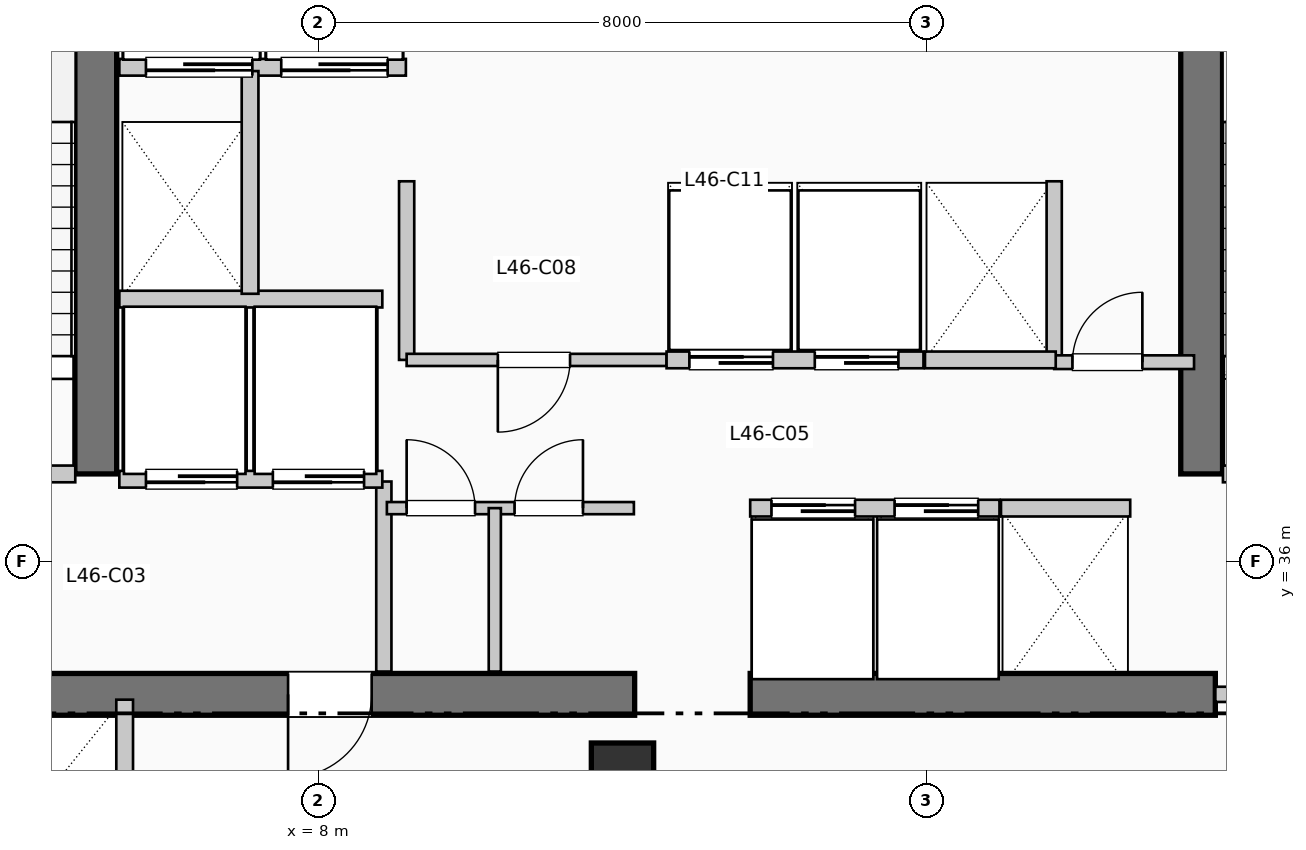
"""IFC4 building model, lengths in metres.
Left out: names, types, materials, properties, quantities, classifications, styles, units other than length and angle.
Written with IfcOpenShell. Run it as: python <this file> out.ifc"""

import sys

from ifc_helpers import new_model, si_unit, direction, frame, frame_2d, origin, origin_2d, place, context, subcontext, project, spatial, rectangle, extrude, element, fill, save


model = new_model("IFC4")
c1 = context("Model", 3, precision=1e-05, world=origin(), true_north=direction((0.0, 1.0)))
c2 = subcontext(c1, "Body", "Model", "MODEL_VIEW")
j1 = project(units=[si_unit("LENGTHUNIT", "METRE"), si_unit("PLANEANGLEUNIT", "RADIAN")], contexts=[c1])
p1 = place(None, origin())
s1 = spatial("IfcSite", under=j1, at=p1, CompositionType="ELEMENT")
p2 = place(p1, origin())
s2 = spatial("IfcBuilding", under=s1, at=p2, CompositionType="ELEMENT")
p3 = place(p2, frame((0.0, 0.0, 191.4)))
s3 = spatial("IfcBuildingStorey", under=s2, at=p3, CompositionType="ELEMENT", Elevation=191.4)
p4 = place(p3, frame((1.45, 34.25, 0.0), z_axis=(0.0, 0.0, 1.0), x_axis=(1.0, 0.0, 0.0)))
e1 = element("IfcWall", 1, at=p4, inside=s3, PredefinedType="SHEAR", context=c2, shape_type="SweptSolid", body=[
    extrude(rectangle(XDim=10.71, YDim=0.55, at=frame_2d((5.355, 0.0))), origin(), (0.0, 0.0, 1.0), 3.96),
])
p5 = place(p4, frame((7.25, 0.0, 0.0), z_axis=(0.0, 0.0, 1.0), x_axis=(-1.0, 0.0, 0.0)))
e2 = element("IfcOpeningElement", 2, at=p5, cuts=e1, PredefinedType="OPENING", context=c2, shape_type="SweptSolid", body=[
    extrude(rectangle(XDim=1.1, YDim=2.15, at=frame_2d((0.55, 1.075))), frame((0.0, 0.285, 0.0), z_axis=(0.0, -1.0, 0.0), x_axis=(1.0, 0.0, 0.0)), (0.0, 0.0, 1.0), 0.57),
])
p6 = place(p3, frame((13.68, 34.25, 0.0), z_axis=(0.0, 0.0, 1.0), x_axis=(1.0, 0.0, 0.0)))
e3 = element("IfcWall", 3, at=p6, inside=s3, PredefinedType="SHEAR", context=c2, shape_type="SweptSolid", body=[
    extrude(rectangle(XDim=6.12, YDim=0.55, at=frame_2d((3.06, 0.0))), origin(), (0.0, 0.0, 1.0), 3.96),
])
for number, where, z_axis, x_axis in (
    (4, (5.07, 37.15, 0.0), (0.0, 0.0, 1.0), (0.0, 1.0, 0.0)),
    (5, (19.62, 37.15, 0.0), (0.0, 0.0, 1.0), (0.0, 1.0, 0.0)),
):
    element("IfcWall", number, at=place(p3, frame(where, z_axis=z_axis, x_axis=x_axis)), inside=s3, PredefinedType="SHEAR", context=c2, shape_type="SweptSolid", body=[
        extrude(rectangle(XDim=7.89, YDim=0.55, at=frame_2d((3.945, 0.0))), origin(), (0.0, 0.0, 1.0), 3.96),
    ])
p7 = place(p3, frame((12.0, 33.2, 0.0), z_axis=(0.0, 0.0, 1.0), x_axis=(1.0, 0.0, 0.0)))
e6 = element("IfcColumn", 6, at=p7, inside=s3, PredefinedType="COLUMN", context=c2, shape_type="SweptSolid", body=[
    extrude(rectangle(XDim=0.82, YDim=0.82, at=origin_2d()), origin(), (0.0, 0.0, 1.0), 3.96),
])
p8 = place(p3, frame((1.65, 37.15, 0.0), z_axis=(0.0, 0.0, 1.0), x_axis=(1.0, 0.0, 0.0)))
e7 = element("IfcWall", 7, at=p8, inside=s3, PredefinedType="PARTITIONING", context=c2, shape_type="SweptSolid", body=[
    extrude(rectangle(XDim=3.15, YDim=0.22, at=frame_2d((1.575, 0.0))), origin(), (0.0, 0.0, 1.0), 3.71),
])
p9 = place(p8, frame((2.05, 0.0, 0.0), z_axis=(0.0, 0.0, 1.0), x_axis=(-1.0, 0.0, 0.0)))
e8 = element("IfcOpeningElement", 8, at=p9, cuts=e7, PredefinedType="OPENING", context=c2, shape_type="SweptSolid", body=[
    extrude(rectangle(XDim=1.05, YDim=2.15, at=frame_2d((0.525, 1.075))), frame((0.0, 0.12, 0.0), z_axis=(0.0, -1.0, 0.0), x_axis=(1.0, 0.0, 0.0)), (0.0, 0.0, 1.0), 0.24),
])
p10 = place(p3, frame((8.86, 34.55, 0.0), z_axis=(0.0, 0.0, 1.0), x_axis=(0.0, 1.0, 0.0)))
e9 = element("IfcWall", 9, at=p10, inside=s3, PredefinedType="PARTITIONING", context=c2, shape_type="SweptSolid", body=[
    extrude(rectangle(XDim=2.5, YDim=0.2, at=frame_2d((1.25, 0.0))), origin(), (0.0, 0.0, 1.0), 3.71),
])
p11 = place(p3, frame((19.9, 37.15, 0.0), z_axis=(0.0, 0.0, 1.0), x_axis=(1.0, 0.0, 0.0)))
e10 = element("IfcWall", 10, at=p11, inside=s3, PredefinedType="PARTITIONING", context=c2, shape_type="SweptSolid", body=[
    extrude(rectangle(XDim=3.15, YDim=0.22, at=frame_2d((1.575, 0.0))), origin(), (0.0, 0.0, 1.0), 3.71),
])
p12 = place(p11, frame((2.05, 0.0, 0.0), z_axis=(0.0, 0.0, 1.0), x_axis=(-1.0, 0.0, 0.0)))
e11 = element("IfcOpeningElement", 11, at=p12, cuts=e10, PredefinedType="OPENING", context=c2, shape_type="SweptSolid", body=[
    extrude(rectangle(XDim=1.05, YDim=2.15, at=frame_2d((0.525, 1.075))), frame((0.0, 0.12, 0.0), z_axis=(0.0, -1.0, 0.0), x_axis=(1.0, 0.0, 0.0)), (0.0, 0.0, 1.0), 0.24),
])
p13 = place(p3, frame((19.8, 34.25, 0.0), z_axis=(0.0, 0.0, 1.0), x_axis=(1.0, 0.0, 0.0)))
e12 = element("IfcWall", 12, at=p13, inside=s3, PredefinedType="PARTITIONING", context=c2, shape_type="SweptSolid", body=[
    extrude(rectangle(XDim=3.25, YDim=0.2, at=frame_2d((1.625, 0.0))), origin(), (0.0, 0.0, 1.0), 3.71),
])
p14 = place(p13, frame((2.15, 0.0, 0.0), z_axis=(0.0, 0.0, 1.0), x_axis=(-1.0, 0.0, 0.0)))
e13 = element("IfcOpeningElement", 13, at=p14, cuts=e12, PredefinedType="OPENING", context=c2, shape_type="SweptSolid", body=[
    extrude(rectangle(XDim=1.1, YDim=2.15, at=frame_2d((0.55, 1.075))), frame((0.0, 0.11, 0.0), z_axis=(0.0, -1.0, 0.0), x_axis=(1.0, 0.0, 0.0)), (0.0, 0.0, 1.0), 0.22),
])
p15 = place(p3, frame((5.38, 37.08, 0.0), z_axis=(0.0, 0.0, 1.0), x_axis=(1.0, 0.0, 0.0)))
e14 = element("IfcWall", 14, at=p15, inside=s3, PredefinedType="PARTITIONING", context=c2, shape_type="SweptSolid", body=[
    extrude(rectangle(XDim=3.46, YDim=0.22, at=frame_2d((1.73, 0.0))), origin(), (0.0, 0.0, 1.0), 3.71),
])
p16 = place(p15, frame((1.55, 0.0, 0.0), z_axis=(0.0, 0.0, 1.0), x_axis=(-1.0, 0.0, 0.0)))
e15 = element("IfcOpeningElement", 15, at=p16, cuts=e14, PredefinedType="OPENING", context=c2, shape_type="SweptSolid", body=[
    extrude(rectangle(XDim=1.2, YDim=2.2, at=frame_2d((0.6, 1.1))), frame((0.0, 0.12, 0.0), z_axis=(0.0, -1.0, 0.0), x_axis=(1.0, 0.0, 0.0)), (0.0, 0.0, 1.0), 0.24),
])
p17 = place(p15, frame((3.22, 0.0, 0.0), z_axis=(0.0, 0.0, 1.0), x_axis=(-1.0, 0.0, 0.0)))
e16 = element("IfcOpeningElement", 16, at=p17, cuts=e14, PredefinedType="OPENING", context=c2, shape_type="SweptSolid", body=[
    extrude(rectangle(XDim=1.2, YDim=2.2, at=frame_2d((0.6, 1.1))), frame((0.0, 0.12, 0.0), z_axis=(0.0, -1.0, 0.0), x_axis=(1.0, 0.0, 0.0)), (0.0, 0.0, 1.0), 0.24),
])
p18 = place(p3, frame((5.38, 39.45, 0.0), z_axis=(0.0, 0.0, 1.0), x_axis=(1.0, 0.0, 0.0)))
e17 = element("IfcWall", 17, at=p18, inside=s3, PredefinedType="PARTITIONING", context=c2, shape_type="SweptSolid", body=[
    extrude(rectangle(XDim=3.46, YDim=0.22, at=frame_2d((1.73, 0.0))), origin(), (0.0, 0.0, 1.0), 3.71),
])
p19 = place(p3, frame((5.38, 42.5, 0.0), z_axis=(0.0, 0.0, 1.0), x_axis=(1.0, 0.0, 0.0)))
e18 = element("IfcWall", 18, at=p19, inside=s3, PredefinedType="PARTITIONING", context=c2, shape_type="SweptSolid", body=[
    extrude(rectangle(XDim=3.77, YDim=0.22, at=frame_2d((1.885, 0.0))), origin(), (0.0, 0.0, 1.0), 3.71),
])
p20 = place(p19, frame((1.75, 0.0, 0.0), z_axis=(0.0, 0.0, 1.0), x_axis=(-1.0, 0.0, 0.0)))
e19 = element("IfcOpeningElement", 19, at=p20, cuts=e18, PredefinedType="OPENING", context=c2, shape_type="SweptSolid", body=[
    extrude(rectangle(XDim=1.4, YDim=2.2, at=frame_2d((0.7, 1.1))), frame((0.0, 0.12, 0.0), z_axis=(0.0, -1.0, 0.0), x_axis=(1.0, 0.0, 0.0)), (0.0, 0.0, 1.0), 0.24),
])
p21 = place(p19, frame((3.53, 0.0, 0.0), z_axis=(0.0, 0.0, 1.0), x_axis=(-1.0, 0.0, 0.0)))
e20 = element("IfcOpeningElement", 20, at=p21, cuts=e18, PredefinedType="OPENING", context=c2, shape_type="SweptSolid", body=[
    extrude(rectangle(XDim=1.4, YDim=2.2, at=frame_2d((0.7, 1.1))), frame((0.0, 0.12, 0.0), z_axis=(0.0, -1.0, 0.0), x_axis=(1.0, 0.0, 0.0)), (0.0, 0.0, 1.0), 0.24),
])
p22 = place(p3, frame((7.1, 39.52, 0.0), z_axis=(0.0, 0.0, 1.0), x_axis=(0.0, 1.0, 0.0)))
e21 = element("IfcWall", 21, at=p22, inside=s3, PredefinedType="PARTITIONING", context=c2, shape_type="SweptSolid", body=[
    extrude(rectangle(XDim=2.93, YDim=0.22, at=frame_2d((1.465, 0.0))), origin(), (0.0, 0.0, 1.0), 3.71),
])
p23 = place(p3, frame((5.45, 31.8, 0.0), z_axis=(0.0, 0.0, 1.0), x_axis=(0.0, 1.0, 0.0)))
e22 = element("IfcWall", 22, at=p23, inside=s3, PredefinedType="PARTITIONING", context=c2, shape_type="SweptSolid", body=[
    extrude(rectangle(XDim=2.38, YDim=0.22, at=frame_2d((1.19, 0.0))), origin(), (0.0, 0.0, 1.0), 3.71),
])
for number, where, z_axis, x_axis in (
    (23, (9.16, 38.65, 0.0), (0.0, 0.0, 1.0), (0.0, 1.0, 0.0)),
    (24, (17.68, 38.65, 0.0), (0.0, 0.0, 1.0), (0.0, 1.0, 0.0)),
):
    element("IfcWall", number, at=place(p3, frame(where, z_axis=z_axis, x_axis=x_axis)), inside=s3, PredefinedType="PARTITIONING", context=c2, shape_type="SweptSolid", body=[
        extrude(rectangle(XDim=2.35, YDim=0.2, at=frame_2d((1.175, 0.0))), origin(), (0.0, 0.0, 1.0), 3.71),
    ])
p24 = place(p3, frame((17.68, 38.62, 0.0), z_axis=(0.0, 0.0, 1.0), x_axis=(1.0, 0.0, 0.0)))
e25 = element("IfcWall", 25, at=p24, inside=s3, PredefinedType="PARTITIONING", context=c2, shape_type="SweptSolid", body=[
    extrude(rectangle(XDim=1.84, YDim=0.18, at=frame_2d((0.92, 0.0))), origin(), (0.0, 0.0, 1.0), 3.71),
])
p25 = place(p24, frame((0.24, 0.0, 0.0)))
e26 = element("IfcOpeningElement", 26, at=p25, cuts=e25, PredefinedType="OPENING", context=c2, shape_type="SweptSolid", body=[
    extrude(rectangle(XDim=0.92, YDim=2.1, at=frame_2d((0.46, 1.05))), frame((0.0, 0.1, 0.0), z_axis=(0.0, -1.0, 0.0), x_axis=(1.0, 0.0, 0.0)), (0.0, 0.0, 1.0), 0.2),
])
p26 = place(p3, frame((8.9, 36.7, 0.0), z_axis=(0.0, 0.0, 1.0), x_axis=(1.0, 0.0, 0.0)))
e27 = element("IfcWall", 27, at=p26, inside=s3, PredefinedType="PARTITIONING", context=c2, shape_type="SweptSolid", body=[
    extrude(rectangle(XDim=3.25, YDim=0.16, at=frame_2d((1.625, 0.0))), origin(), (0.0, 0.0, 1.0), 3.71),
])
p27 = place(p26, frame((0.26, 0.0, 0.0)))
e28 = element("IfcOpeningElement", 28, at=p27, cuts=e27, PredefinedType="OPENING", context=c2, shape_type="SweptSolid", body=[
    extrude(rectangle(XDim=0.9, YDim=2.15, at=frame_2d((0.45, 1.075))), frame((0.0, 0.09, 0.0), z_axis=(0.0, -1.0, 0.0), x_axis=(1.0, 0.0, 0.0)), (0.0, 0.0, 1.0), 0.18),
])
p28 = place(p26, frame((1.68, 0.0, 0.0)))
e29 = element("IfcOpeningElement", 29, at=p28, cuts=e27, PredefinedType="OPENING", context=c2, shape_type="SweptSolid", body=[
    extrude(rectangle(XDim=0.9, YDim=2.15, at=frame_2d((0.45, 1.075))), frame((0.0, 0.09, 0.0), z_axis=(0.0, -1.0, 0.0), x_axis=(1.0, 0.0, 0.0)), (0.0, 0.0, 1.0), 0.18),
])
p29 = place(p3, frame((10.32, 34.55, 0.0), z_axis=(0.0, 0.0, 1.0), x_axis=(0.0, 1.0, 0.0)))
e30 = element("IfcWall", 30, at=p29, inside=s3, PredefinedType="PARTITIONING", context=c2, shape_type="SweptSolid", body=[
    extrude(rectangle(XDim=2.15, YDim=0.16, at=frame_2d((1.075, 0.0))), origin(), (0.0, 0.0, 1.0), 3.71),
])
p30 = place(p3, frame((9.16, 38.65, 0.0), z_axis=(0.0, 0.0, 1.0), x_axis=(1.0, 0.0, 0.0)))
e31 = element("IfcWall", 31, at=p30, inside=s3, PredefinedType="PARTITIONING", context=c2, shape_type="SweptSolid", body=[
    extrude(rectangle(XDim=3.42, YDim=0.16, at=frame_2d((1.71, 0.0))), origin(), (0.0, 0.0, 1.0), 3.71),
])
p31 = place(p30, frame((2.15, 0.0, 0.0), z_axis=(0.0, 0.0, 1.0), x_axis=(-1.0, 0.0, 0.0)))
e32 = element("IfcOpeningElement", 32, at=p31, cuts=e31, PredefinedType="OPENING", context=c2, shape_type="SweptSolid", body=[
    extrude(rectangle(XDim=0.95, YDim=2.15, at=frame_2d((0.475, 1.075))), frame((0.0, 0.09, 0.0), z_axis=(0.0, -1.0, 0.0), x_axis=(1.0, 0.0, 0.0)), (0.0, 0.0, 1.0), 0.18),
])
p32 = place(p3, frame((13.68, 36.7, 0.0), z_axis=(0.0, 0.0, 1.0), x_axis=(1.0, 0.0, 0.0)))
e33 = element("IfcWall", 33, at=p32, inside=s3, PredefinedType="PARTITIONING", context=c2, shape_type="SweptSolid", body=[
    extrude(rectangle(XDim=3.28, YDim=0.22, at=frame_2d((1.64, 0.0))), origin(), (0.0, 0.0, 1.0), 3.71),
])
p33 = place(p32, frame((0.28, 0.0, 0.0)))
e34 = element("IfcOpeningElement", 34, at=p33, cuts=e33, PredefinedType="OPENING", context=c2, shape_type="SweptSolid", body=[
    extrude(rectangle(XDim=1.1, YDim=2.2, at=frame_2d((0.55, 1.1))), frame((0.0, 0.12, 0.0), z_axis=(0.0, -1.0, 0.0), x_axis=(1.0, 0.0, 0.0)), (0.0, 0.0, 1.0), 0.24),
])
p34 = place(p32, frame((1.9, 0.0, 0.0)))
e35 = element("IfcOpeningElement", 35, at=p34, cuts=e33, PredefinedType="OPENING", context=c2, shape_type="SweptSolid", body=[
    extrude(rectangle(XDim=1.1, YDim=2.2, at=frame_2d((0.55, 1.1))), frame((0.0, 0.12, 0.0), z_axis=(0.0, -1.0, 0.0), x_axis=(1.0, 0.0, 0.0)), (0.0, 0.0, 1.0), 0.24),
])
p35 = place(p3, frame((12.58, 38.65, 0.0), z_axis=(0.0, 0.0, 1.0), x_axis=(1.0, 0.0, 0.0)))
e36 = element("IfcWall", 36, at=p35, inside=s3, PredefinedType="PARTITIONING", context=c2, shape_type="SweptSolid", body=[
    extrude(rectangle(XDim=3.38, YDim=0.22, at=frame_2d((1.69, 0.0))), origin(), (0.0, 0.0, 1.0), 3.71),
])
p36 = place(p35, frame((0.3, 0.0, 0.0)))
e37 = element("IfcOpeningElement", 37, at=p36, cuts=e36, PredefinedType="OPENING", context=c2, shape_type="SweptSolid", body=[
    extrude(rectangle(XDim=1.1, YDim=2.2, at=frame_2d((0.55, 1.1))), frame((0.0, 0.12, 0.0), z_axis=(0.0, -1.0, 0.0), x_axis=(1.0, 0.0, 0.0)), (0.0, 0.0, 1.0), 0.24),
])
p37 = place(p35, frame((1.95, 0.0, 0.0)))
e38 = element("IfcOpeningElement", 38, at=p37, cuts=e36, PredefinedType="OPENING", context=c2, shape_type="SweptSolid", body=[
    extrude(rectangle(XDim=1.1, YDim=2.2, at=frame_2d((0.55, 1.1))), frame((0.0, 0.12, 0.0), z_axis=(0.0, -1.0, 0.0), x_axis=(1.0, 0.0, 0.0)), (0.0, 0.0, 1.0), 0.24),
])
p38 = place(p3, frame((16.98, 36.7, 0.0), z_axis=(0.0, 0.0, 1.0), x_axis=(1.0, 0.0, 0.0)))
e39 = element("IfcWall", 39, at=p38, inside=s3, PredefinedType="PARTITIONING", context=c2, shape_type="SweptSolid", body=[
    extrude(rectangle(XDim=1.7, YDim=0.22, at=frame_2d((0.85, 0.0))), origin(), (0.0, 0.0, 1.0), 3.71),
])
p39 = place(p3, frame((15.98, 38.65, 0.0), z_axis=(0.0, 0.0, 1.0), x_axis=(1.0, 0.0, 0.0)))
e40 = element("IfcWall", 40, at=p39, inside=s3, PredefinedType="PARTITIONING", context=c2, shape_type="SweptSolid", body=[
    extrude(rectangle(XDim=1.72, YDim=0.22, at=frame_2d((0.86, 0.0))), origin(), (0.0, 0.0, 1.0), 3.71),
])
p40 = place(p5, origin())
e41 = element("IfcDoor", 41, at=p40, inside=s3, OperationType="SINGLE_SWING_LEFT", PredefinedType="DOOR", context=c2, shape_type="SweptSolid", body=[
    extrude(rectangle(XDim=1.1, YDim=2.15, at=frame_2d((0.55, 1.075))), frame((0.0, 0.025, 0.0), z_axis=(0.0, -1.0, 0.0), x_axis=(1.0, 0.0, 0.0)), (0.0, 0.0, 1.0), 0.05),
])
fill(e2, e41)
p41 = place(p16, origin())
e42 = element("IfcDoor", 42, at=p41, inside=s3, OperationType="SLIDING_TO_RIGHT", PredefinedType="DOOR", context=c2, shape_type="SweptSolid", body=[
    extrude(rectangle(XDim=1.2, YDim=2.2, at=frame_2d((0.6, 1.1))), frame((0.0, 0.025, 0.0), z_axis=(0.0, -1.0, 0.0), x_axis=(1.0, 0.0, 0.0)), (0.0, 0.0, 1.0), 0.05),
])
fill(e15, e42)
p42 = place(p17, origin())
e43 = element("IfcDoor", 43, at=p42, inside=s3, OperationType="SLIDING_TO_RIGHT", PredefinedType="DOOR", context=c2, shape_type="SweptSolid", body=[
    extrude(rectangle(XDim=1.2, YDim=2.2, at=frame_2d((0.6, 1.1))), frame((0.0, 0.025, 0.0), z_axis=(0.0, -1.0, 0.0), x_axis=(1.0, 0.0, 0.0)), (0.0, 0.0, 1.0), 0.05),
])
fill(e16, e43)
p43 = place(p20, origin())
e44 = element("IfcDoor", 44, at=p43, inside=s3, OperationType="SLIDING_TO_LEFT", PredefinedType="DOOR", context=c2, shape_type="SweptSolid", body=[
    extrude(rectangle(XDim=1.4, YDim=2.2, at=frame_2d((0.7, 1.1))), frame((0.0, 0.025, 0.0), z_axis=(0.0, -1.0, 0.0), x_axis=(1.0, 0.0, 0.0)), (0.0, 0.0, 1.0), 0.05),
])
fill(e19, e44)
p44 = place(p21, origin())
e45 = element("IfcDoor", 45, at=p44, inside=s3, OperationType="SLIDING_TO_LEFT", PredefinedType="DOOR", context=c2, shape_type="SweptSolid", body=[
    extrude(rectangle(XDim=1.4, YDim=2.2, at=frame_2d((0.7, 1.1))), frame((0.0, 0.025, 0.0), z_axis=(0.0, -1.0, 0.0), x_axis=(1.0, 0.0, 0.0)), (0.0, 0.0, 1.0), 0.05),
])
fill(e20, e45)
p45 = place(p25, origin())
e46 = element("IfcDoor", 46, at=p45, inside=s3, OperationType="SINGLE_SWING_RIGHT", PredefinedType="DOOR", context=c2, shape_type="SweptSolid", body=[
    extrude(rectangle(XDim=0.92, YDim=2.1, at=frame_2d((0.46, 1.05))), frame((0.0, 0.025, 0.0), z_axis=(0.0, -1.0, 0.0), x_axis=(1.0, 0.0, 0.0)), (0.0, 0.0, 1.0), 0.05),
])
fill(e26, e46)
p46 = place(p27, origin())
e47 = element("IfcDoor", 47, at=p46, inside=s3, OperationType="SINGLE_SWING_LEFT", PredefinedType="DOOR", context=c2, shape_type="SweptSolid", body=[
    extrude(rectangle(XDim=0.9, YDim=2.15, at=frame_2d((0.45, 1.075))), frame((0.0, 0.025, 0.0), z_axis=(0.0, -1.0, 0.0), x_axis=(1.0, 0.0, 0.0)), (0.0, 0.0, 1.0), 0.05),
])
fill(e28, e47)
p47 = place(p28, origin())
e48 = element("IfcDoor", 48, at=p47, inside=s3, OperationType="SINGLE_SWING_RIGHT", PredefinedType="DOOR", context=c2, shape_type="SweptSolid", body=[
    extrude(rectangle(XDim=0.9, YDim=2.15, at=frame_2d((0.45, 1.075))), frame((0.0, 0.025, 0.0), z_axis=(0.0, -1.0, 0.0), x_axis=(1.0, 0.0, 0.0)), (0.0, 0.0, 1.0), 0.05),
])
fill(e29, e48)
p48 = place(p31, origin())
e49 = element("IfcDoor", 49, at=p48, inside=s3, OperationType="SINGLE_SWING_LEFT", PredefinedType="DOOR", context=c2, shape_type="SweptSolid", body=[
    extrude(rectangle(XDim=0.95, YDim=2.15, at=frame_2d((0.475, 1.075))), frame((0.0, 0.025, 0.0), z_axis=(0.0, -1.0, 0.0), x_axis=(1.0, 0.0, 0.0)), (0.0, 0.0, 1.0), 0.05),
])
fill(e32, e49)
p49 = place(p33, origin())
e50 = element("IfcDoor", 50, at=p49, inside=s3, OperationType="SLIDING_TO_RIGHT", PredefinedType="DOOR", context=c2, shape_type="SweptSolid", body=[
    extrude(rectangle(XDim=1.1, YDim=2.2, at=frame_2d((0.55, 1.1))), frame((0.0, 0.025, 0.0), z_axis=(0.0, -1.0, 0.0), x_axis=(1.0, 0.0, 0.0)), (0.0, 0.0, 1.0), 0.05),
])
fill(e34, e50)
p50 = place(p34, origin())
e51 = element("IfcDoor", 51, at=p50, inside=s3, OperationType="SLIDING_TO_RIGHT", PredefinedType="DOOR", context=c2, shape_type="SweptSolid", body=[
    extrude(rectangle(XDim=1.1, YDim=2.2, at=frame_2d((0.55, 1.1))), frame((0.0, 0.025, 0.0), z_axis=(0.0, -1.0, 0.0), x_axis=(1.0, 0.0, 0.0)), (0.0, 0.0, 1.0), 0.05),
])
fill(e35, e51)
p51 = place(p36, origin())
e52 = element("IfcDoor", 52, at=p51, inside=s3, OperationType="SLIDING_TO_RIGHT", PredefinedType="DOOR", context=c2, shape_type="SweptSolid", body=[
    extrude(rectangle(XDim=1.1, YDim=2.2, at=frame_2d((0.55, 1.1))), frame((0.0, 0.025, 0.0), z_axis=(0.0, -1.0, 0.0), x_axis=(1.0, 0.0, 0.0)), (0.0, 0.0, 1.0), 0.05),
])
fill(e37, e52)
p52 = place(p37, origin())
e53 = element("IfcDoor", 53, at=p52, inside=s3, OperationType="SLIDING_TO_RIGHT", PredefinedType="DOOR", context=c2, shape_type="SweptSolid", body=[
    extrude(rectangle(XDim=1.1, YDim=2.2, at=frame_2d((0.55, 1.1))), frame((0.0, 0.025, 0.0), z_axis=(0.0, -1.0, 0.0), x_axis=(1.0, 0.0, 0.0)), (0.0, 0.0, 1.0), 0.05),
])
fill(e38, e53)
save(model, sys.argv[1])
